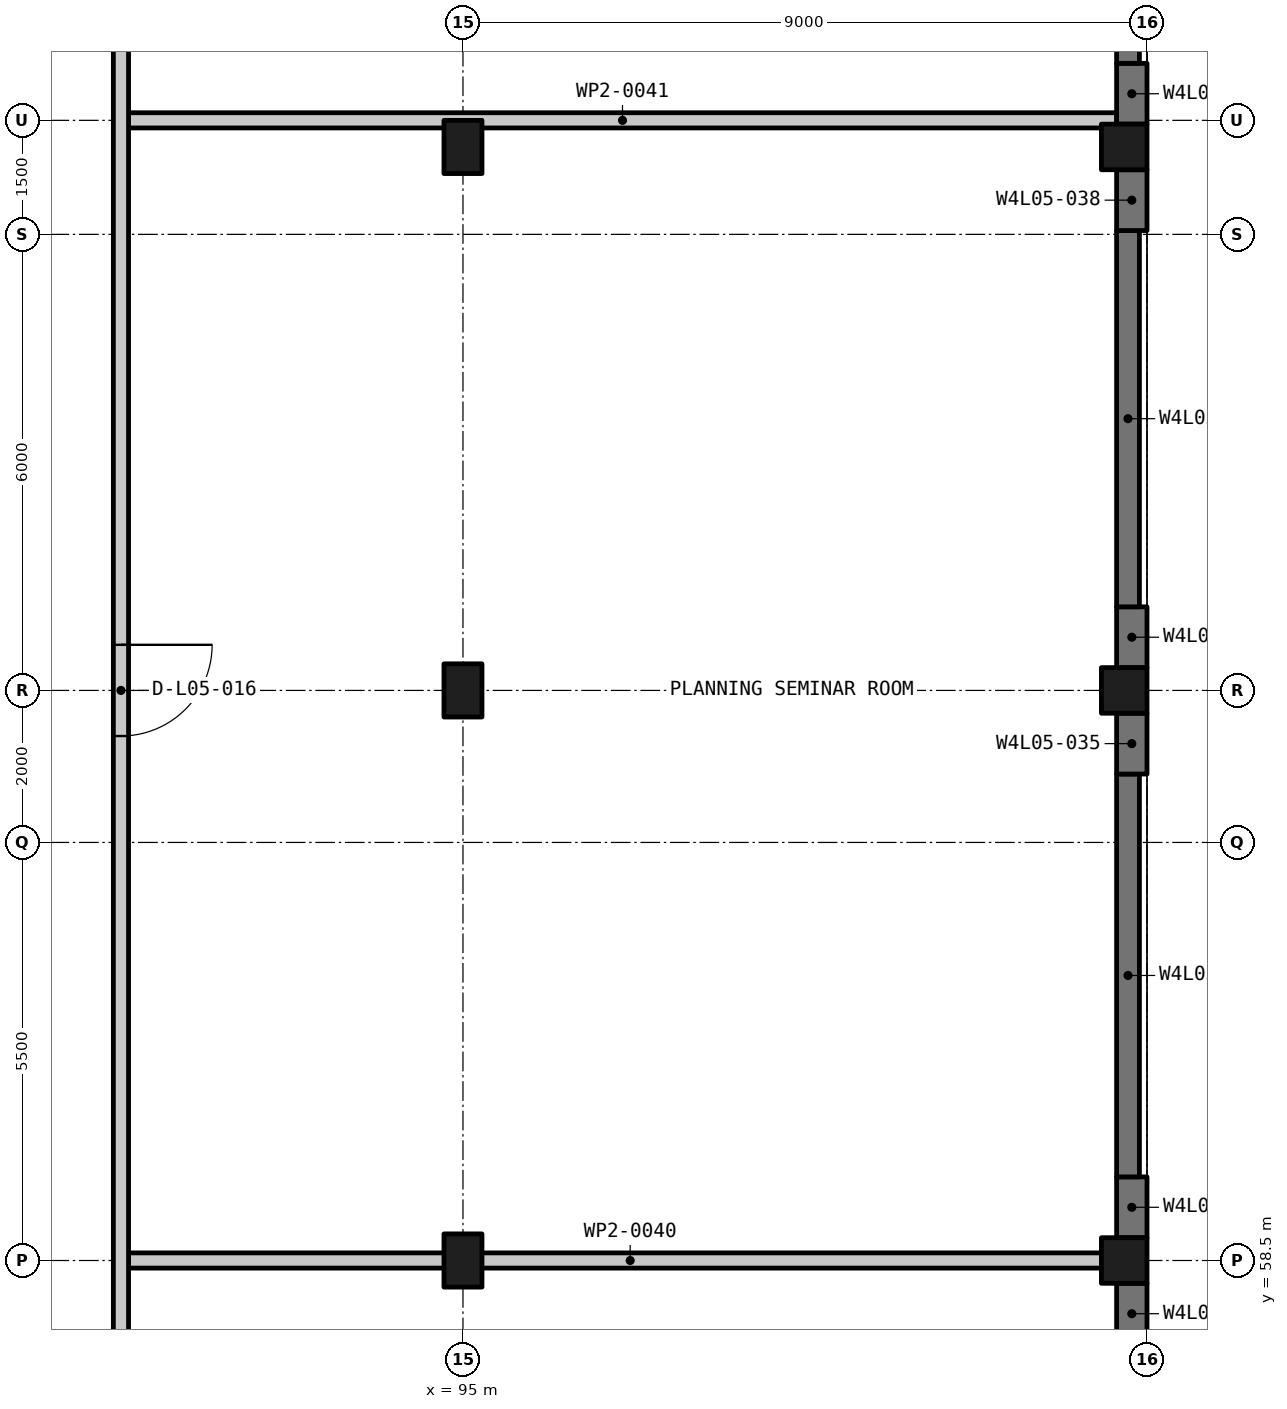
"""IFC4 building model, lengths in metres.
Left out: names, types, materials, properties, quantities, classifications, styles, units other than length and angle.
Written with IfcOpenShell. Run it as: python <this file> out.ifc"""

import sys

from ifc_helpers import new_model, si_unit, direction, frame, frame_2d, origin, origin_2d, place, context, subcontext, project, spatial, rectangle, extrude, element, fill, save


model = new_model("IFC4")
c1 = context("Model", 3, precision=1e-05, world=origin(), true_north=direction((0.0, 1.0)))
c2 = subcontext(c1, "Body", "Model", "MODEL_VIEW")
j1 = project(units=[si_unit("LENGTHUNIT", "METRE"), si_unit("PLANEANGLEUNIT", "RADIAN")], contexts=[c1])
p1 = place(None, origin())
s1 = spatial("IfcSite", under=j1, at=p1, CompositionType="ELEMENT")
p2 = place(p1, origin())
s2 = spatial("IfcBuilding", under=s1, at=p2, CompositionType="ELEMENT")
p3 = place(p2, frame((0.0, 0.0, 24.75)))
s3 = spatial("IfcBuildingStorey", under=s2, at=p3, CompositionType="ELEMENT", Elevation=24.75)
for number, where, z_axis, x_axis in (
    (1, (95.0, 58.5, -0.3), (0.0, 0.0, 1.0), (1.0, 0.0, 0.0)),
    (2, (95.0, 66.0, -0.3), (0.0, 0.0, 1.0), (1.0, 0.0, 0.0)),
    (3, (95.0, 73.15, -0.3), (0.0, 0.0, 1.0), (1.0, 0.0, 0.0)),
):
    element("IfcColumn", number, at=place(p3, frame(where, z_axis=z_axis, x_axis=x_axis)), inside=s3, PredefinedType="COLUMN", context=c2, shape_type="SweptSolid", body=[
        extrude(rectangle(XDim=0.5, YDim=0.7, at=origin_2d()), origin(), (0.0, 0.0, 1.0), 4.5),
    ])
for number, where, z_axis, x_axis in (
    (4, (103.7, 58.5, -0.3), (0.0, 0.0, 1.0), (1.0, 0.0, 0.0)),
    (5, (103.7, 66.0, -0.3), (0.0, 0.0, 1.0), (1.0, 0.0, 0.0)),
    (6, (103.7, 73.15, -0.3), (0.0, 0.0, 1.0), (1.0, 0.0, 0.0)),
):
    element("IfcColumn", number, at=place(p3, frame(where, z_axis=z_axis, x_axis=x_axis)), inside=s3, PredefinedType="COLUMN", context=c2, shape_type="SweptSolid", body=[
        extrude(rectangle(XDim=0.6, YDim=0.6, at=origin_2d()), origin(), (0.0, 0.0, 1.0), 4.5),
    ])
for number, where, z_axis, x_axis in (
    (7, (103.8, 57.4, -0.3), (0.0, 0.0, 1.0), (0.0, 1.0, 0.0)),
    (8, (103.8, 58.8, -0.3), (0.0, 0.0, 1.0), (0.0, 1.0, 0.0)),
):
    element("IfcWall", number, at=place(p3, frame(where, z_axis=z_axis, x_axis=x_axis)), inside=s3, PredefinedType="SOLIDWALL", context=c2, shape_type="SweptSolid", body=[
        extrude(rectangle(XDim=0.8, YDim=0.4, at=frame_2d((0.4, 0.0))), origin(), (0.0, 0.0, 1.0), 4.5),
    ])
p4 = place(p3, frame((103.75, 59.6, -0.3), z_axis=(0.0, 0.0, 1.0), x_axis=(0.0, 1.0, 0.0)))
e9 = element("IfcWall", 9, at=p4, inside=s3, PredefinedType="SOLIDWALL", context=c2, shape_type="SweptSolid", body=[
    extrude(rectangle(XDim=5.3, YDim=0.3, at=frame_2d((2.65, 0.0))), origin(), (0.0, 0.0, 1.0), 4.5),
])
for number, where, z_axis, x_axis in (
    (10, (103.8, 64.9, -0.3), (0.0, 0.0, 1.0), (0.0, 1.0, 0.0)),
    (11, (103.8, 66.3, -0.3), (0.0, 0.0, 1.0), (0.0, 1.0, 0.0)),
):
    element("IfcWall", number, at=place(p3, frame(where, z_axis=z_axis, x_axis=x_axis)), inside=s3, PredefinedType="SOLIDWALL", context=c2, shape_type="SweptSolid", body=[
        extrude(rectangle(XDim=0.8, YDim=0.4, at=frame_2d((0.4, 0.0))), origin(), (0.0, 0.0, 1.0), 4.5),
    ])
p5 = place(p3, frame((103.75, 67.1, -0.3), z_axis=(0.0, 0.0, 1.0), x_axis=(0.0, 1.0, 0.0)))
e12 = element("IfcWall", 12, at=p5, inside=s3, PredefinedType="SOLIDWALL", context=c2, shape_type="SweptSolid", body=[
    extrude(rectangle(XDim=4.95, YDim=0.3, at=frame_2d((2.475, 0.0))), origin(), (0.0, 0.0, 1.0), 4.5),
])
for number, where, z_axis, x_axis in (
    (13, (103.8, 72.05, -0.3), (0.0, 0.0, 1.0), (0.0, 1.0, 0.0)),
    (14, (103.8, 73.45, -0.3), (0.0, 0.0, 1.0), (0.0, 1.0, 0.0)),
):
    element("IfcWall", number, at=place(p3, frame(where, z_axis=z_axis, x_axis=x_axis)), inside=s3, PredefinedType="SOLIDWALL", context=c2, shape_type="SweptSolid", body=[
        extrude(rectangle(XDim=0.8, YDim=0.4, at=frame_2d((0.4, 0.0))), origin(), (0.0, 0.0, 1.0), 4.5),
    ])
p6 = place(p3, frame((103.75, 74.25, -0.3), z_axis=(0.0, 0.0, 1.0), x_axis=(0.0, 1.0, 0.0)))
e15 = element("IfcWall", 15, at=p6, inside=s3, PredefinedType="SOLIDWALL", context=c2, shape_type="SweptSolid", body=[
    extrude(rectangle(XDim=5.3, YDim=0.3, at=frame_2d((2.65, 0.0))), origin(), (0.0, 0.0, 1.0), 4.5),
])
p7 = place(p3, frame((90.6, 58.5, 0.0), z_axis=(0.0, 0.0, 1.0), x_axis=(1.0, 0.0, 0.0)))
e16 = element("IfcWall", 16, at=p7, inside=s3, PredefinedType="PARTITIONING", context=c2, shape_type="SweptSolid", body=[
    extrude(rectangle(XDim=13.2, YDim=0.2, at=frame_2d((6.6, 0.0))), origin(), (0.0, 0.0, 1.0), 3.3),
])
p8 = place(p3, frame((90.6, 73.5, 0.0), z_axis=(0.0, 0.0, 1.0), x_axis=(1.0, 0.0, 0.0)))
e17 = element("IfcWall", 17, at=p8, inside=s3, PredefinedType="PARTITIONING", context=c2, shape_type="SweptSolid", body=[
    extrude(rectangle(XDim=12.998, YDim=0.2, at=frame_2d((6.499, 0.0))), origin(), (0.0, 0.0, 1.0), 3.4),
])
p9 = place(p3, frame((90.5, 80.8, 0.0), z_axis=(0.0, 0.0, 1.0), x_axis=(0.0, -1.0, 0.0)))
e18 = element("IfcWall", 18, at=p9, inside=s3, PredefinedType="PARTITIONING", context=c2, shape_type="SweptSolid", body=[
    extrude(rectangle(XDim=52.1, YDim=0.2, at=frame_2d((26.05, 0.0))), origin(), (0.0, 0.0, 1.0), 3.3),
])
p10 = place(p9, frame((44.1, 0.0, 0.0)))
e19 = element("IfcOpeningElement", 19, at=p10, cuts=e18, PredefinedType="OPENING", context=c2, shape_type="SweptSolid", body=[
    extrude(rectangle(XDim=1.2, YDim=2.1, at=frame_2d((0.6, 1.05))), frame((0.0, 0.11, 0.0), z_axis=(0.0, -1.0, 0.0), x_axis=(1.0, 0.0, 0.0)), (0.0, 0.0, 1.0), 0.22),
])
p11 = place(p9, frame((35.199, 0.0, 0.0)))
e20 = element("IfcOpeningElement", 20, at=p11, cuts=e18, PredefinedType="OPENING", context=c2, shape_type="SweptSolid", body=[
    extrude(rectangle(XDim=1.2, YDim=2.1, at=frame_2d((0.6, 1.05))), frame((0.0, 0.11, 0.0), z_axis=(0.0, -1.0, 0.0), x_axis=(1.0, 0.0, 0.0)), (0.0, 0.0, 1.0), 0.22),
])
p12 = place(p9, frame((14.2, 0.0, 0.0)))
e21 = element("IfcOpeningElement", 21, at=p12, cuts=e18, PredefinedType="OPENING", context=c2, shape_type="SweptSolid", body=[
    extrude(rectangle(XDim=1.2, YDim=2.1, at=frame_2d((0.6, 1.05))), frame((0.0, 0.11, 0.0), z_axis=(0.0, -1.0, 0.0), x_axis=(1.0, 0.0, 0.0)), (0.0, 0.0, 1.0), 0.22),
])
p13 = place(p9, frame((3.075, 0.0, 0.0)))
e22 = element("IfcOpeningElement", 22, at=p13, cuts=e18, PredefinedType="OPENING", context=c2, shape_type="SweptSolid", body=[
    extrude(rectangle(XDim=1.2, YDim=2.1, at=frame_2d((0.6, 1.05))), frame((0.0, 0.11, 0.0), z_axis=(0.0, -1.0, 0.0), x_axis=(1.0, 0.0, 0.0)), (0.0, 0.0, 1.0), 0.22),
])
p14 = place(p12, origin())
e23 = element("IfcDoor", 23, at=p14, inside=s3, OperationType="SINGLE_SWING_RIGHT", PredefinedType="DOOR", context=c2, shape_type="SweptSolid", body=[
    extrude(rectangle(XDim=1.2, YDim=2.1, at=frame_2d((0.6, 1.05))), frame((0.0, 0.025, 0.0), z_axis=(0.0, -1.0, 0.0), x_axis=(1.0, 0.0, 0.0)), (0.0, 0.0, 1.0), 0.05),
])
fill(e21, e23)
save(model, sys.argv[1])
